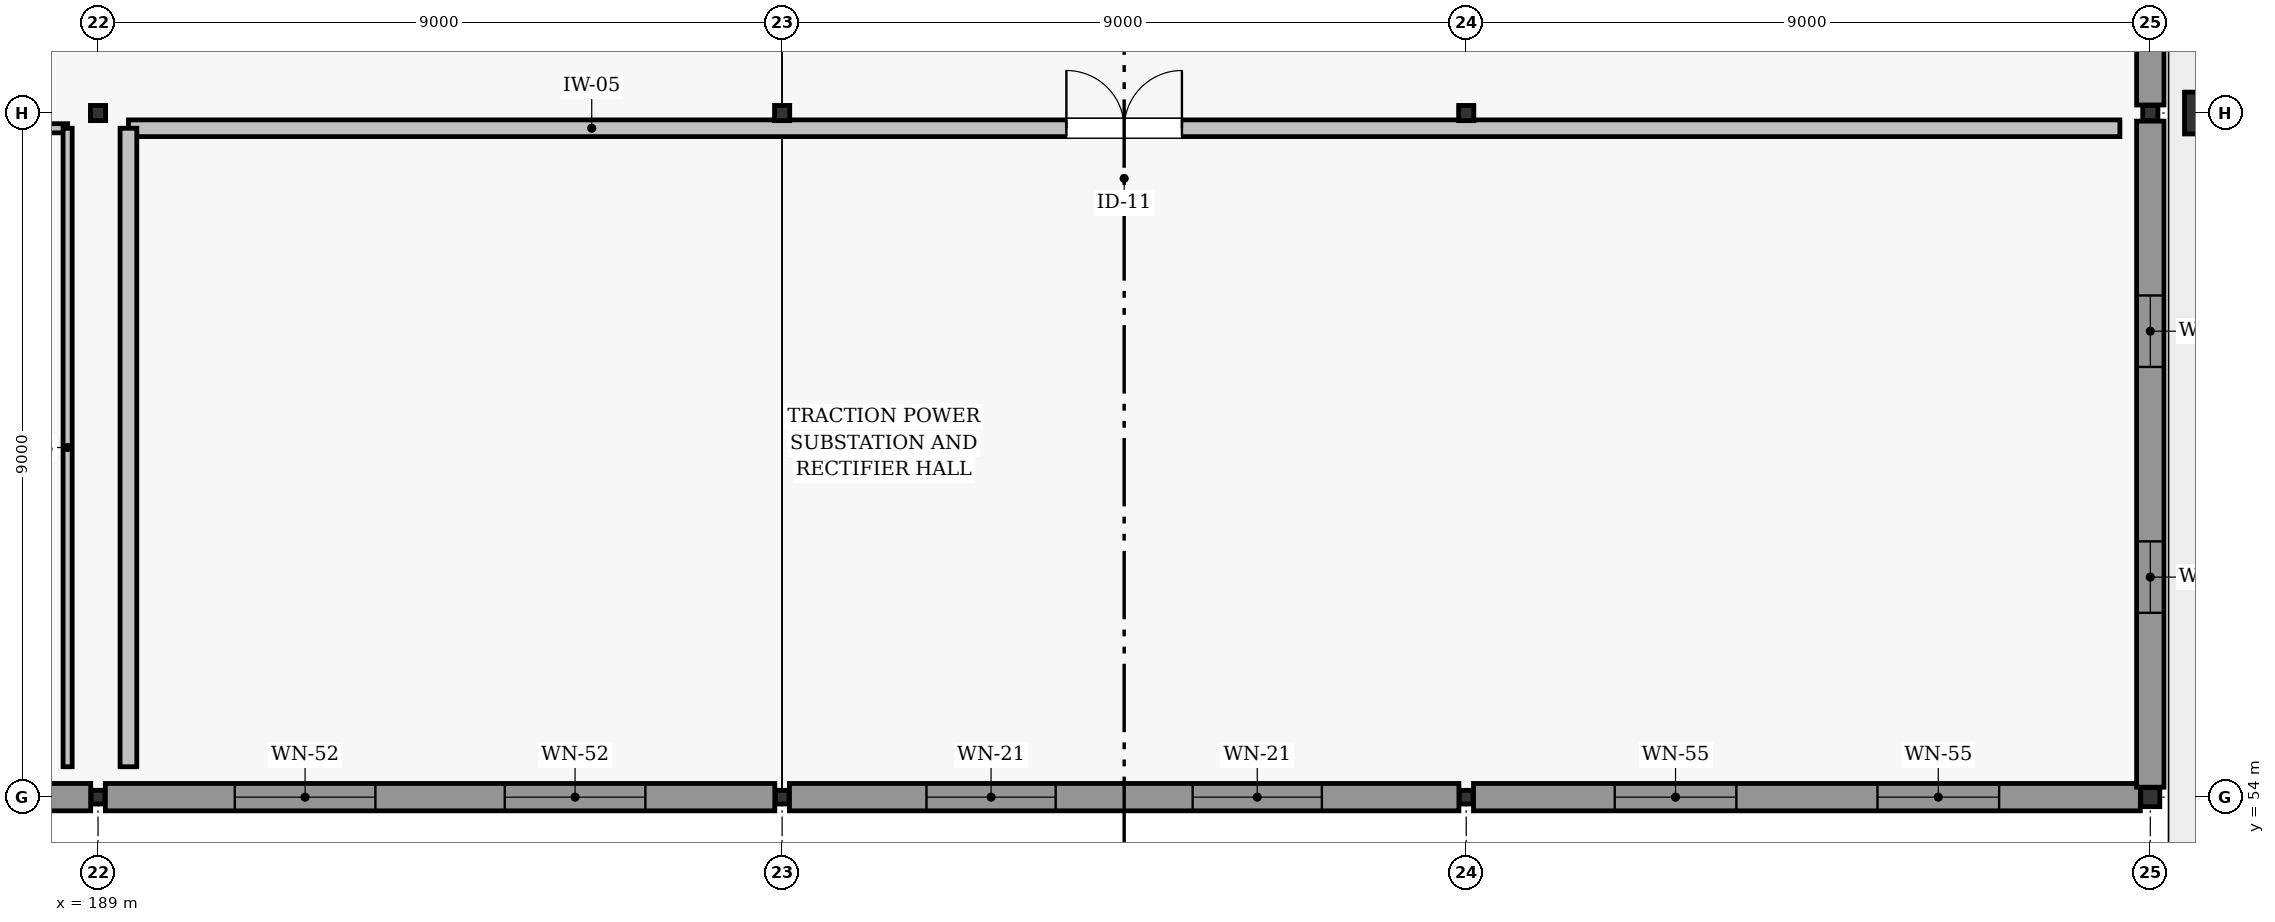
"""IFC4 building model, lengths in metres.
Left out: names, types, materials, properties, quantities, classifications, styles, units other than length and angle.
Written with IfcOpenShell. Run it as: python <this file> out.ifc"""

import sys

from ifc_helpers import new_model, si_unit, direction, frame, frame_2d, origin, origin_2d, place, context, subcontext, project, spatial, rectangle, hollow_rectangle, extrude, element, fill, save


model = new_model("IFC4")
c1 = context("Model", 3, precision=1e-05, world=origin(), true_north=direction((0.0, 1.0)))
c2 = subcontext(c1, "Body", "Model", "MODEL_VIEW")
j1 = project(units=[si_unit("LENGTHUNIT", "METRE"), si_unit("PLANEANGLEUNIT", "RADIAN")], contexts=[c1])
p1 = place(None, origin())
s1 = spatial("IfcSite", under=j1, at=p1, CompositionType="ELEMENT")
p2 = place(p1, origin())
s2 = spatial("IfcBuilding", under=s1, at=p2, CompositionType="ELEMENT")
p3 = place(p2, origin())
s3 = spatial("IfcBuildingStorey", under=s2, at=p3, CompositionType="ELEMENT", Elevation=0.0)
p4 = place(p3, frame((189.0, 54.0, 0.0), z_axis=(0.0, 0.0, 1.0), x_axis=(1.0, 0.0, 0.0)))
e1 = element("IfcColumn", 1, at=p4, inside=s3, PredefinedType="COLUMN", context=c2, shape_type="SweptSolid", body=[
    extrude(hollow_rectangle(XDim=0.18, YDim=0.18, WallThickness=0.008, InnerFilletRadius=0.008, OuterFilletRadius=0.016, at=origin_2d()), origin(), (0.0, 0.0, 1.0), 4.8),
])
p5 = place(p3, frame((189.0, 63.0, 0.0), z_axis=(0.0, 0.0, 1.0), x_axis=(1.0, 0.0, 0.0)))
e2 = element("IfcColumn", 2, at=p5, inside=s3, PredefinedType="COLUMN", context=c2, shape_type="SweptSolid", body=[
    extrude(hollow_rectangle(XDim=0.2, YDim=0.2, WallThickness=0.008, InnerFilletRadius=0.008, OuterFilletRadius=0.016, at=origin_2d()), origin(), (0.0, 0.0, 1.0), 4.8),
])
p6 = place(p3, frame((198.0, 54.0, 0.0), z_axis=(0.0, 0.0, 1.0), x_axis=(1.0, 0.0, 0.0)))
e3 = element("IfcColumn", 3, at=p6, inside=s3, PredefinedType="COLUMN", context=c2, shape_type="SweptSolid", body=[
    extrude(hollow_rectangle(XDim=0.18, YDim=0.18, WallThickness=0.008, InnerFilletRadius=0.008, OuterFilletRadius=0.016, at=origin_2d()), origin(), (0.0, 0.0, 1.0), 4.8),
])
p7 = place(p3, frame((198.0, 63.0, 0.0), z_axis=(0.0, 0.0, 1.0), x_axis=(1.0, 0.0, 0.0)))
e4 = element("IfcColumn", 4, at=p7, inside=s3, PredefinedType="COLUMN", context=c2, shape_type="SweptSolid", body=[
    extrude(hollow_rectangle(XDim=0.2, YDim=0.2, WallThickness=0.008, InnerFilletRadius=0.008, OuterFilletRadius=0.016, at=origin_2d()), origin(), (0.0, 0.0, 1.0), 4.8),
])
p8 = place(p3, frame((207.0, 54.0, 0.0), z_axis=(0.0, 0.0, 1.0), x_axis=(1.0, 0.0, 0.0)))
e5 = element("IfcColumn", 5, at=p8, inside=s3, PredefinedType="COLUMN", context=c2, shape_type="SweptSolid", body=[
    extrude(hollow_rectangle(XDim=0.18, YDim=0.18, WallThickness=0.008, InnerFilletRadius=0.008, OuterFilletRadius=0.016, at=origin_2d()), origin(), (0.0, 0.0, 1.0), 4.8),
])
p9 = place(p3, frame((207.0, 63.0, 0.0), z_axis=(0.0, 0.0, 1.0), x_axis=(1.0, 0.0, 0.0)))
e6 = element("IfcColumn", 6, at=p9, inside=s3, PredefinedType="COLUMN", context=c2, shape_type="SweptSolid", body=[
    extrude(hollow_rectangle(XDim=0.2, YDim=0.2, WallThickness=0.008, InnerFilletRadius=0.008, OuterFilletRadius=0.016, at=origin_2d()), origin(), (0.0, 0.0, 1.0), 4.8),
])
p10 = place(p3, frame((216.0, 54.0, 0.0), z_axis=(0.0, 0.0, 1.0), x_axis=(1.0, 0.0, 0.0)))
e7 = element("IfcColumn", 7, at=p10, inside=s3, PredefinedType="COLUMN", context=c2, shape_type="SweptSolid", body=[
    extrude(hollow_rectangle(XDim=0.25, YDim=0.25, WallThickness=0.01, InnerFilletRadius=0.01, OuterFilletRadius=0.02, at=origin_2d()), origin(), (0.0, 0.0, 1.0), 4.8),
])
p11 = place(p3, frame((216.0, 63.0, 0.0), z_axis=(0.0, 0.0, 1.0), x_axis=(1.0, 0.0, 0.0)))
e8 = element("IfcColumn", 8, at=p11, inside=s3, PredefinedType="COLUMN", context=c2, shape_type="SweptSolid", body=[
    extrude(hollow_rectangle(XDim=0.2, YDim=0.2, WallThickness=0.008, InnerFilletRadius=0.008, OuterFilletRadius=0.016, at=origin_2d()), origin(), (0.0, 0.0, 1.0), 4.8),
])
p12 = place(p3, frame((216.85, 63.0, 0.0), z_axis=(0.0, 0.0, 1.0), x_axis=(0.0, 1.0, 0.0)))
e9 = element("IfcColumn", 9, at=p12, inside=s3, PredefinedType="PILASTER", context=c2, shape_type="SweptSolid", body=[
    extrude(rectangle(XDim=0.55, YDim=0.8, at=origin_2d()), origin(), (0.0, 0.0, 1.0), 4.8),
])
p13 = place(p3, frame((180.096, 54.0, 0.0), z_axis=(0.0, 0.0, 1.0), x_axis=(1.0, 0.0, 0.0)))
e10 = element("IfcWall", 10, at=p13, inside=s3, PredefinedType="SOLIDWALL", context=c2, shape_type="SweptSolid", body=[
    extrude(rectangle(XDim=8.808, YDim=0.36, at=frame_2d((4.404, 0.0))), origin(), (0.0, 0.0, 1.0), 4.142),
])
p14 = place(p13, frame((1.636, 0.0, 0.8)))
e11 = element("IfcOpeningElement", 11, at=p14, cuts=e10, PredefinedType="OPENING", context=c2, shape_type="SweptSolid", body=[
    extrude(rectangle(XDim=1.95, YDim=2.05, at=frame_2d((0.975, 1.025))), frame((0.0, 0.19, 0.0), z_axis=(0.0, -1.0, 0.0), x_axis=(1.0, 0.0, 0.0)), (0.0, 0.0, 1.0), 0.38),
])
p15 = place(p13, frame((5.222, 0.0, 0.8)))
e12 = element("IfcOpeningElement", 12, at=p15, cuts=e10, PredefinedType="OPENING", context=c2, shape_type="SweptSolid", body=[
    extrude(rectangle(XDim=1.95, YDim=2.05, at=frame_2d((0.975, 1.025))), frame((0.0, 0.19, 0.0), z_axis=(0.0, -1.0, 0.0), x_axis=(1.0, 0.0, 0.0)), (0.0, 0.0, 1.0), 0.38),
])
p16 = place(p3, frame((189.096, 54.0, 0.0), z_axis=(0.0, 0.0, 1.0), x_axis=(1.0, 0.0, 0.0)))
e13 = element("IfcWall", 13, at=p16, inside=s3, PredefinedType="SOLIDWALL", context=c2, shape_type="SweptSolid", body=[
    extrude(rectangle(XDim=8.808, YDim=0.36, at=frame_2d((4.404, 0.0))), origin(), (0.0, 0.0, 1.0), 4.142),
])
p17 = place(p16, frame((1.703, 0.0, 0.8)))
e14 = element("IfcOpeningElement", 14, at=p17, cuts=e13, PredefinedType="OPENING", context=c2, shape_type="SweptSolid", body=[
    extrude(rectangle(XDim=1.85, YDim=1.98, at=frame_2d((0.925, 0.99))), frame((0.0, 0.19, 0.0), z_axis=(0.0, -1.0, 0.0), x_axis=(1.0, 0.0, 0.0)), (0.0, 0.0, 1.0), 0.38),
])
p18 = place(p16, frame((5.255, 0.0, 0.8)))
e15 = element("IfcOpeningElement", 15, at=p18, cuts=e13, PredefinedType="OPENING", context=c2, shape_type="SweptSolid", body=[
    extrude(rectangle(XDim=1.85, YDim=1.98, at=frame_2d((0.925, 0.99))), frame((0.0, 0.19, 0.0), z_axis=(0.0, -1.0, 0.0), x_axis=(1.0, 0.0, 0.0)), (0.0, 0.0, 1.0), 0.38),
])
p19 = place(p3, frame((198.096, 54.0, 0.0), z_axis=(0.0, 0.0, 1.0), x_axis=(1.0, 0.0, 0.0)))
e16 = element("IfcWall", 16, at=p19, inside=s3, PredefinedType="SOLIDWALL", context=c2, shape_type="SweptSolid", body=[
    extrude(rectangle(XDim=8.808, YDim=0.36, at=frame_2d((4.404, 0.0))), origin(), (0.0, 0.0, 1.0), 4.142),
])
p20 = place(p19, frame((1.803, 0.0, 0.8)))
e17 = element("IfcOpeningElement", 17, at=p20, cuts=e16, PredefinedType="OPENING", context=c2, shape_type="SweptSolid", body=[
    extrude(rectangle(XDim=1.7, YDim=1.92, at=frame_2d((0.85, 0.96))), frame((0.0, 0.19, 0.0), z_axis=(0.0, -1.0, 0.0), x_axis=(1.0, 0.0, 0.0)), (0.0, 0.0, 1.0), 0.38),
])
p21 = place(p19, frame((5.305, 0.0, 0.8)))
e18 = element("IfcOpeningElement", 18, at=p21, cuts=e16, PredefinedType="OPENING", context=c2, shape_type="SweptSolid", body=[
    extrude(rectangle(XDim=1.7, YDim=1.92, at=frame_2d((0.85, 0.96))), frame((0.0, 0.19, 0.0), z_axis=(0.0, -1.0, 0.0), x_axis=(1.0, 0.0, 0.0)), (0.0, 0.0, 1.0), 0.38),
])
p22 = place(p3, frame((207.096, 54.0, 0.0), z_axis=(0.0, 0.0, 1.0), x_axis=(1.0, 0.0, 0.0)))
e19 = element("IfcWall", 19, at=p22, inside=s3, PredefinedType="SOLIDWALL", context=c2, shape_type="SweptSolid", body=[
    extrude(rectangle(XDim=8.773, YDim=0.36, at=frame_2d((4.386, 0.0))), origin(), (0.0, 0.0, 1.0), 4.142),
])
p23 = place(p22, frame((1.858, 0.0, 0.85)))
e20 = element("IfcOpeningElement", 20, at=p23, cuts=e19, PredefinedType="OPENING", context=c2, shape_type="SweptSolid", body=[
    extrude(rectangle(XDim=1.6, YDim=1.86, at=frame_2d((0.8, 0.93))), frame((0.0, 0.19, 0.0), z_axis=(0.0, -1.0, 0.0), x_axis=(1.0, 0.0, 0.0)), (0.0, 0.0, 1.0), 0.38),
])
p24 = place(p22, frame((5.315, 0.0, 0.85)))
e21 = element("IfcOpeningElement", 21, at=p24, cuts=e19, PredefinedType="OPENING", context=c2, shape_type="SweptSolid", body=[
    extrude(rectangle(XDim=1.6, YDim=1.86, at=frame_2d((0.8, 0.93))), frame((0.0, 0.19, 0.0), z_axis=(0.0, -1.0, 0.0), x_axis=(1.0, 0.0, 0.0)), (0.0, 0.0, 1.0), 0.38),
])
p25 = place(p3, frame((216.0, 54.131, 0.0), z_axis=(0.0, 0.0, 1.0), x_axis=(0.0, 1.0, 0.0)))
e22 = element("IfcWall", 22, at=p25, inside=s3, PredefinedType="SOLIDWALL", context=c2, shape_type="SweptSolid", body=[
    extrude(rectangle(XDim=8.763, YDim=0.36, at=frame_2d((4.381, 0.0))), origin(), (0.0, 0.0, 1.0), 4.142),
])
p26 = place(p25, frame((2.294, 0.0, 0.85)))
e23 = element("IfcOpeningElement", 23, at=p26, cuts=e22, PredefinedType="OPENING", context=c2, shape_type="SweptSolid", body=[
    extrude(rectangle(XDim=0.94, YDim=1.28, at=frame_2d((0.47, 0.64))), frame((0.0, 0.19, 0.0), z_axis=(0.0, -1.0, 0.0), x_axis=(1.0, 0.0, 0.0)), (0.0, 0.0, 1.0), 0.38),
])
p27 = place(p25, frame((5.529, 0.0, 0.85)))
e24 = element("IfcOpeningElement", 24, at=p27, cuts=e22, PredefinedType="OPENING", context=c2, shape_type="SweptSolid", body=[
    extrude(rectangle(XDim=0.94, YDim=1.28, at=frame_2d((0.47, 0.64))), frame((0.0, 0.19, 0.0), z_axis=(0.0, -1.0, 0.0), x_axis=(1.0, 0.0, 0.0)), (0.0, 0.0, 1.0), 0.38),
])
p28 = place(p3, frame((216.0, 63.106, 0.0), z_axis=(0.0, 0.0, 1.0), x_axis=(0.0, 1.0, 0.0)))
e25 = element("IfcWall", 25, at=p28, inside=s3, PredefinedType="SOLIDWALL", context=c2, shape_type="SweptSolid", body=[
    extrude(rectangle(XDim=8.798, YDim=0.36, at=frame_2d((4.399, 0.0))), origin(), (0.0, 0.0, 1.0), 4.142),
])
p29 = place(p28, frame((0.884, 0.0, 0.0)))
e26 = element("IfcOpeningElement", 26, at=p29, cuts=e25, PredefinedType="OPENING", context=c2, shape_type="SweptSolid", body=[
    extrude(rectangle(XDim=1.12, YDim=2.14, at=frame_2d((0.56, 1.07))), frame((0.0, 0.19, 0.0), z_axis=(0.0, -1.0, 0.0), x_axis=(1.0, 0.0, 0.0)), (0.0, 0.0, 1.0), 0.38),
])
p30 = place(p3, frame((171.4, 62.8, 0.0), z_axis=(0.0, 0.0, 1.0), x_axis=(1.0, 0.0, 0.0)))
e27 = element("IfcWall", 27, at=p30, inside=s3, PredefinedType="PARTITIONING", context=c2, shape_type="SweptSolid", body=[
    extrude(rectangle(XDim=17.2, YDim=0.12, at=frame_2d((8.6, 0.0))), origin(), (0.0, 0.0, 1.0), 4.145),
])
p31 = place(p30, frame((3.63, 0.0, 0.0)))
e28 = element("IfcOpeningElement", 28, at=p31, cuts=e27, PredefinedType="OPENING", context=c2, shape_type="SweptSolid", body=[
    extrude(rectangle(XDim=0.94, YDim=2.06, at=frame_2d((0.47, 1.03))), frame((0.0, 0.07, 0.0), z_axis=(0.0, -1.0, 0.0), x_axis=(1.0, 0.0, 0.0)), (0.0, 0.0, 1.0), 0.14),
])
p32 = place(p3, frame((188.6, 54.4, 0.0), z_axis=(0.0, 0.0, 1.0), x_axis=(0.0, 1.0, 0.0)))
e29 = element("IfcWall", 29, at=p32, inside=s3, PredefinedType="PARTITIONING", context=c2, shape_type="SweptSolid", body=[
    extrude(rectangle(XDim=8.4, YDim=0.12, at=frame_2d((4.2, 0.0))), origin(), (0.0, 0.0, 1.0), 4.55),
])
p33 = place(p3, frame((189.4, 62.8, 0.0), z_axis=(0.0, 0.0, 1.0), x_axis=(1.0, 0.0, 0.0)))
e30 = element("IfcWall", 30, at=p33, inside=s3, PredefinedType="SOLIDWALL", context=c2, shape_type="SweptSolid", body=[
    extrude(rectangle(XDim=26.2, YDim=0.22, at=frame_2d((13.1, 0.0))), origin(), (0.0, 0.0, 1.0), 4.145),
])
p34 = place(p33, frame((12.34, 0.0, 0.0)))
e31 = element("IfcOpeningElement", 31, at=p34, cuts=e30, PredefinedType="OPENING", context=c2, shape_type="SweptSolid", body=[
    extrude(rectangle(XDim=1.52, YDim=2.16, at=frame_2d((0.76, 1.08))), frame((0.0, 0.12, 0.0), z_axis=(0.0, -1.0, 0.0), x_axis=(1.0, 0.0, 0.0)), (0.0, 0.0, 1.0), 0.24),
])
p35 = place(p3, frame((189.4, 54.4, 0.0), z_axis=(0.0, 0.0, 1.0), x_axis=(0.0, 1.0, 0.0)))
e32 = element("IfcWall", 32, at=p35, inside=s3, PredefinedType="SOLIDWALL", context=c2, shape_type="SweptSolid", body=[
    extrude(rectangle(XDim=8.4, YDim=0.22, at=frame_2d((4.2, 0.0))), origin(), (0.0, 0.0, 1.0), 4.55),
])
p36 = place(p17, origin())
e33 = element("IfcWindow", 33, at=p36, inside=s3, PartitioningType="SINGLE_PANEL", PredefinedType="WINDOW", context=c2, shape_type="SweptSolid", body=[
    extrude(rectangle(XDim=1.85, YDim=1.98, at=frame_2d((0.925, 0.99))), frame((0.0, 0.03, 0.0), z_axis=(0.0, -1.0, 0.0), x_axis=(1.0, 0.0, 0.0)), (0.0, 0.0, 1.0), 0.06),
])
fill(e14, e33)
p37 = place(p18, origin())
e34 = element("IfcWindow", 34, at=p37, inside=s3, PartitioningType="SINGLE_PANEL", PredefinedType="WINDOW", context=c2, shape_type="SweptSolid", body=[
    extrude(rectangle(XDim=1.85, YDim=1.98, at=frame_2d((0.925, 0.99))), frame((0.0, 0.03, 0.0), z_axis=(0.0, -1.0, 0.0), x_axis=(1.0, 0.0, 0.0)), (0.0, 0.0, 1.0), 0.06),
])
fill(e15, e34)
p38 = place(p20, origin())
e35 = element("IfcWindow", 35, at=p38, inside=s3, PartitioningType="SINGLE_PANEL", PredefinedType="WINDOW", context=c2, shape_type="SweptSolid", body=[
    extrude(rectangle(XDim=1.7, YDim=1.92, at=frame_2d((0.85, 0.96))), frame((0.0, 0.03, 0.0), z_axis=(0.0, -1.0, 0.0), x_axis=(1.0, 0.0, 0.0)), (0.0, 0.0, 1.0), 0.06),
])
fill(e17, e35)
p39 = place(p21, origin())
e36 = element("IfcWindow", 36, at=p39, inside=s3, PartitioningType="SINGLE_PANEL", PredefinedType="WINDOW", context=c2, shape_type="SweptSolid", body=[
    extrude(rectangle(XDim=1.7, YDim=1.92, at=frame_2d((0.85, 0.96))), frame((0.0, 0.03, 0.0), z_axis=(0.0, -1.0, 0.0), x_axis=(1.0, 0.0, 0.0)), (0.0, 0.0, 1.0), 0.06),
])
fill(e18, e36)
p40 = place(p23, origin())
e37 = element("IfcWindow", 37, at=p40, inside=s3, PartitioningType="SINGLE_PANEL", PredefinedType="WINDOW", context=c2, shape_type="SweptSolid", body=[
    extrude(rectangle(XDim=1.6, YDim=1.86, at=frame_2d((0.8, 0.93))), frame((0.0, 0.03, 0.0), z_axis=(0.0, -1.0, 0.0), x_axis=(1.0, 0.0, 0.0)), (0.0, 0.0, 1.0), 0.06),
])
fill(e20, e37)
p41 = place(p24, origin())
e38 = element("IfcWindow", 38, at=p41, inside=s3, PartitioningType="SINGLE_PANEL", PredefinedType="WINDOW", context=c2, shape_type="SweptSolid", body=[
    extrude(rectangle(XDim=1.6, YDim=1.86, at=frame_2d((0.8, 0.93))), frame((0.0, 0.03, 0.0), z_axis=(0.0, -1.0, 0.0), x_axis=(1.0, 0.0, 0.0)), (0.0, 0.0, 1.0), 0.06),
])
fill(e21, e38)
p42 = place(p26, origin())
e39 = element("IfcWindow", 39, at=p42, inside=s3, PartitioningType="SINGLE_PANEL", PredefinedType="WINDOW", context=c2, shape_type="SweptSolid", body=[
    extrude(rectangle(XDim=0.94, YDim=1.28, at=frame_2d((0.47, 0.64))), frame((0.0, 0.03, 0.0), z_axis=(0.0, -1.0, 0.0), x_axis=(1.0, 0.0, 0.0)), (0.0, 0.0, 1.0), 0.06),
])
fill(e23, e39)
p43 = place(p27, origin())
e40 = element("IfcWindow", 40, at=p43, inside=s3, PartitioningType="SINGLE_PANEL", PredefinedType="WINDOW", context=c2, shape_type="SweptSolid", body=[
    extrude(rectangle(XDim=0.94, YDim=1.28, at=frame_2d((0.47, 0.64))), frame((0.0, 0.03, 0.0), z_axis=(0.0, -1.0, 0.0), x_axis=(1.0, 0.0, 0.0)), (0.0, 0.0, 1.0), 0.06),
])
fill(e24, e40)
p44 = place(p34, origin())
e41 = element("IfcDoor", 41, at=p44, inside=s3, OperationType="DOUBLE_SWING_LEFT", PredefinedType="DOOR", context=c2, shape_type="SweptSolid", body=[
    extrude(rectangle(XDim=1.52, YDim=2.16, at=frame_2d((0.76, 1.08))), frame((0.0, 0.025, 0.0), z_axis=(0.0, -1.0, 0.0), x_axis=(1.0, 0.0, 0.0)), (0.0, 0.0, 1.0), 0.05),
])
fill(e31, e41)
save(model, sys.argv[1])
